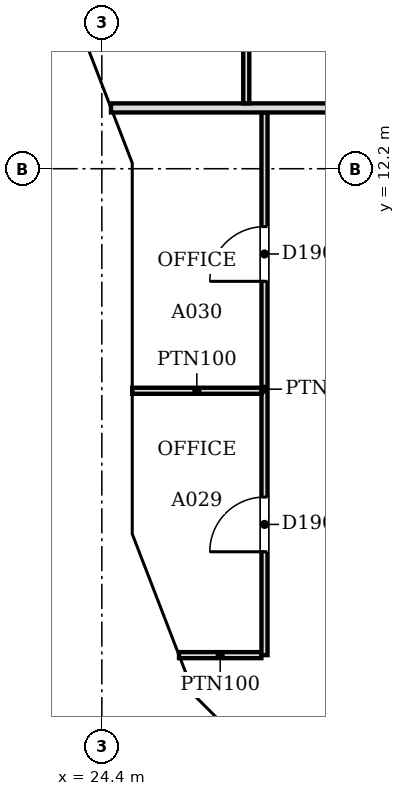
"""IFC4 building model, lengths in metres.
Left out: names, types, materials, properties, quantities, classifications, styles, units other than length and angle.
Written with IfcOpenShell. Run it as: python <this file> out.ifc"""

import sys

from ifc_helpers import new_model, si_unit, direction, frame, frame_2d, origin, place, context, subcontext, project, spatial, polyline, rectangle, outline, extrude, faceted_brep, source, transform, mapped, element, fill, save


model = new_model("IFC4")
c1 = context("Model", 3, precision=1e-05, world=origin(), true_north=direction((0.0, 1.0)))
c2 = subcontext(c1, "Body", "Model", "MODEL_VIEW")
j1 = project(units=[si_unit("LENGTHUNIT", "METRE"), si_unit("PLANEANGLEUNIT", "RADIAN")], contexts=[c1])
p1 = place(None, origin())
s1 = spatial("IfcSite", under=j1, at=p1, CompositionType="ELEMENT")
p2 = place(p1, origin())
s2 = spatial("IfcBuilding", under=s1, at=p2, CompositionType="ELEMENT")
p3 = place(p2, frame((0.0, 0.0, 16.8)))
s3 = spatial("IfcBuildingStorey", under=s2, at=p3, CompositionType="ELEMENT", Elevation=16.8)
m1 = source(origin(), c2, "Body", "Brep", [
    faceted_brep([(3.156, -0.25, 0.066), (0.106, -0.25, 4.424), (0.106, -0.25, 0.0), (3.156, -0.25, 0.0), (0.0, 0.25, 4.425), (0.053, 0.25, 4.5), (3.202, 0.25, 0.0), (0.0, 0.25, 0.0), (0.053, 0.0, 4.5), (3.202, -0.0, 0.0)], [[[0, 1, 2, 3]], [[4, 5, 6, 7]], [[6, 5, 8, 1, 0, 9]], [[5, 4, 8]], [[7, 6, 9, 3, 2]], [[7, 2, 1, 8, 4]], [[3, 9, 0]]]),
])
p4 = place(p3, frame((23.497, 15.234, 0.0), z_axis=(0.0, 0.0, 1.0), x_axis=(0.359913782069, -0.932985567668, 0.0)))
e1 = element("IfcWall", 1, at=p4, inside=s3, PredefinedType="SOLIDWALL", context=c2, shape_type="MappedRepresentation", body=[
    mapped(m1, transform((0.0, 0.0, 0.0), scale=1.0)),
])
m2 = source(origin(), c2, "Body", "SweptSolid", [
    extrude(outline(polyline([(2.722, 0.25), (0.253, 3.778), (0.253, 0.25), (2.722, 0.25)])), frame((0.0, 0.26, 0.0), z_axis=(0.0, -1.0, 0.0), x_axis=(1.0, 0.0, 0.0)), (0.0, 0.0, 1.0), 0.52),
])
p5 = place(p4, origin())
e2 = element("IfcOpeningElement", 2, at=p5, cuts=e1, PredefinedType="OPENING", context=c2, shape_type="MappedRepresentation", body=[
    mapped(m2, transform((0.0, 0.0, 0.0), scale=1.0)),
])
m3 = source(origin(), c2, "Body", "Brep", [
    faceted_brep([(6.1, -0.25, 0.0), (3.096, -0.25, 4.5), (0.047, -0.25, 0.068), (0.047, -0.25, 0.0), (0.0, 0.25, 0.0), (3.096, 0.25, 4.5), (6.053, 0.25, 0.07), (6.053, 0.25, 0.0), (6.1, -0.0, 0.0), (0.0, 0.0, 0.0)], [[[0, 1, 2, 3]], [[4, 5, 6, 7]], [[6, 5, 1, 0, 8]], [[5, 4, 9, 2, 1]], [[4, 7, 8, 0, 3, 9]], [[9, 3, 2]], [[8, 7, 6]]]),
])
p6 = place(p3, frame((24.65, 12.247, 0.0), z_axis=(0.0, 0.0, 1.0), x_axis=(0.0, -1.0, 0.0)))
e3 = element("IfcWall", 3, at=p6, inside=s3, PredefinedType="SOLIDWALL", context=c2, shape_type="MappedRepresentation", body=[
    mapped(m3, transform((0.0, 0.0, 0.0), scale=1.0)),
])
m4 = source(origin(), c2, "Body", "SweptSolid", [
    extrude(outline(polyline([(5.633, 0.25), (3.094, 4.054), (0.476, 0.25), (5.633, 0.25)])), frame((0.0, 0.26, 0.0), z_axis=(0.0, -1.0, 0.0), x_axis=(1.0, 0.0, 0.0)), (0.0, 0.0, 1.0), 0.52),
])
p7 = place(p6, origin())
e4 = element("IfcOpeningElement", 4, at=p7, cuts=e3, PredefinedType="OPENING", context=c2, shape_type="MappedRepresentation", body=[
    mapped(m4, transform((0.0, 0.0, 0.0), scale=1.0)),
])
m5 = source(origin(), c2, "Body", "Brep", [
    faceted_brep([(3.003, -0.25, 4.419), (2.95, -0.25, 4.5), (0.0, -0.25, 0.0), (3.003, -0.25, 0.0), (0.047, 0.25, 0.071), (2.898, 0.25, 4.419), (2.898, 0.25, 0.0), (0.047, 0.25, 0.0), (2.95, 0.0, 4.5), (0.0, 0.0, 0.0)], [[[0, 1, 2, 3]], [[4, 5, 6, 7]], [[8, 1, 0]], [[5, 4, 9, 2, 1, 8]], [[7, 6, 3, 2, 9]], [[7, 9, 4]], [[3, 6, 5, 8, 0]]]),
])
p8 = place(p3, frame((24.65, 6.146, 0.0), z_axis=(0.0, 0.0, 1.0), x_axis=(0.359953949349, -0.932970071518, 0.0)))
e5 = element("IfcWall", 5, at=p8, inside=s3, PredefinedType="SOLIDWALL", context=c2, shape_type="MappedRepresentation", body=[
    mapped(m5, transform((0.0, 0.0, 0.0), scale=1.0)),
])
m6 = source(origin(), c2, "Body", "SweptSolid", [
    extrude(outline(polyline([(2.75, 3.739), (0.463, 0.25), (2.75, 0.25), (2.75, 3.739)])), frame((0.0, 0.26, 0.0), z_axis=(0.0, -1.0, 0.0), x_axis=(1.0, 0.0, 0.0)), (0.0, 0.0, 1.0), 0.52),
])
p9 = place(p8, origin())
e6 = element("IfcOpeningElement", 6, at=p9, cuts=e5, PredefinedType="OPENING", context=c2, shape_type="MappedRepresentation", body=[
    mapped(m6, transform((0.0, 0.0, 0.0), scale=1.0)),
])
m7 = source(origin(), c2, "Body", "Brep", [
    faceted_brep([(2.997, -0.25, 0.0), (0.053, -0.25, 4.5), (0.0, -0.25, 4.419), (0.0, -0.25, 0.0), (0.106, 0.25, 4.419), (2.944, 0.25, 0.081), (2.944, 0.25, 0.0), (0.106, 0.25, 0.0), (0.053, 0.0, 4.5), (2.997, 0.0, 0.0)], [[[0, 1, 2, 3]], [[4, 5, 6, 7]], [[5, 4, 8, 1, 0, 9]], [[2, 1, 8]], [[7, 6, 9, 0, 3]], [[7, 3, 2, 8, 4]], [[9, 6, 5]]]),
])
p10 = place(p3, frame((25.675, 3.431, 0.0), z_axis=(0.0, 0.0, 1.0), x_axis=(0.707106781187, -0.707106781187, 0.0)))
e7 = element("IfcWall", 7, at=p10, inside=s3, PredefinedType="SOLIDWALL", context=c2, shape_type="MappedRepresentation", body=[
    mapped(m7, transform((0.0, 0.0, 0.0), scale=1.0)),
])
m8 = source(origin(), c2, "Body", "SweptSolid", [
    extrude(outline(polyline([(2.535, 0.25), (0.253, 3.738), (0.253, 0.25), (2.535, 0.25)])), frame((0.0, 0.26, 0.0), z_axis=(0.0, -1.0, 0.0), x_axis=(1.0, 0.0, 0.0)), (0.0, 0.0, 1.0), 0.52),
])
p11 = place(p10, origin())
e8 = element("IfcOpeningElement", 8, at=p11, cuts=e7, PredefinedType="OPENING", context=c2, shape_type="MappedRepresentation", body=[
    mapped(m8, transform((0.0, 0.0, 0.0), scale=1.0)),
])
p12 = place(p2, frame((0.0, 0.0, 21.3)))
s4 = spatial("IfcBuildingStorey", under=s2, at=p12, CompositionType="ELEMENT", Elevation=21.3)
m9 = source(origin(), c2, "Body", "Brep", [
    faceted_brep([(3.103, -0.25, 8.934), (0.053, -0.25, 4.576), (0.053, -0.25, 4.424), (3.103, -0.25, 0.066), (0.0, 0.25, 4.5), (3.149, 0.25, 9.0), (3.196, 0.25, 8.932), (3.196, 0.25, 0.068), (3.149, 0.25, 0.0), (3.149, -0.0, 0.0), (3.149, -0.0, 9.0), (0.0, 0.0, 4.5)], [[[0, 1, 2, 3]], [[4, 5, 6, 7, 8]], [[8, 7, 9]], [[6, 5, 10]], [[5, 4, 11, 1, 0, 10]], [[4, 8, 9, 3, 2, 11]], [[11, 2, 1]], [[3, 9, 7, 6, 10, 0]]]),
])
p13 = place(p12, frame((23.517, 15.185, -4.5), z_axis=(0.0, 0.0, 1.0), x_axis=(0.359864468756, -0.933004589553, 0.0)))
e9 = element("IfcWall", 9, at=p13, inside=s4, PredefinedType="SOLIDWALL", context=c2, shape_type="MappedRepresentation", body=[
    mapped(m9, transform((0.0, 0.0, 0.0), scale=1.0)),
])
m10 = source(origin(), c2, "Body", "SweptSolid", [
    extrude(outline(polyline([(2.949, 8.278), (0.305, 4.5), (2.949, 0.722), (2.949, 8.278)])), frame((0.0, 0.26, 0.0), z_axis=(0.0, -1.0, 0.0), x_axis=(1.0, 0.0, 0.0)), (0.0, 0.0, 1.0), 0.52),
])
p14 = place(p13, origin())
e10 = element("IfcOpeningElement", 10, at=p14, cuts=e9, PredefinedType="OPENING", context=c2, shape_type="MappedRepresentation", body=[
    mapped(m10, transform((0.0, 0.0, 0.0), scale=1.0)),
])
m11 = source(origin(), c2, "Body", "Brep", [
    faceted_brep([(0.093, -0.25, 0.068), (3.143, -0.25, 4.5), (0.093, -0.25, 8.932), (0.0, 0.25, 8.934), (0.047, 0.25, 9.0), (3.143, 0.25, 4.5), (0.047, 0.25, 0.0), (0.0, 0.25, 0.066), (0.047, 0.0, 0.0), (0.047, 0.0, 9.0)], [[[0, 1, 2]], [[3, 4, 5, 6, 7]], [[6, 5, 1, 0, 8]], [[5, 4, 9, 2, 1]], [[4, 3, 9]], [[7, 6, 8]], [[7, 8, 0, 2, 9, 3]]]),
])
p15 = place(p12, frame((24.65, 12.293, -4.5), z_axis=(0.0, 0.0, 1.0), x_axis=(0.0, -1.0, 0.0)))
e11 = element("IfcWall", 11, at=p15, inside=s4, PredefinedType="SOLIDWALL", context=c2, shape_type="MappedRepresentation", body=[
    mapped(m11, transform((0.0, 0.0, 0.0), scale=1.0)),
])
m12 = source(origin(), c2, "Body", "SweptSolid", [
    extrude(outline(polyline([(0.247, 0.732), (2.84, 4.5), (0.247, 8.268), (0.247, 0.732)])), frame((0.0, 0.26, 0.0), z_axis=(0.0, -1.0, 0.0), x_axis=(1.0, 0.0, 0.0)), (0.0, 0.0, 1.0), 0.52),
])
p16 = place(p15, origin())
e12 = element("IfcOpeningElement", 12, at=p16, cuts=e11, PredefinedType="OPENING", context=c2, shape_type="MappedRepresentation", body=[
    mapped(m12, transform((0.0, 0.0, 0.0), scale=1.0)),
])
m13 = source(origin(), c2, "Body", "Brep", [
    faceted_brep([(3.003, -0.25, 0.0), (3.05, -0.25, 0.071), (3.05, -0.25, 8.929), (3.003, -0.25, 9.0), (0.0, -0.25, 4.5), (0.0, 0.25, 4.5), (2.957, 0.25, 8.93), (2.957, 0.25, 0.07), (3.003, 0.0, 0.0), (3.003, 0.0, 9.0)], [[[0, 1, 2, 3, 4]], [[5, 6, 7]], [[1, 0, 8]], [[9, 3, 2]], [[6, 5, 4, 3, 9]], [[5, 7, 8, 0, 4]], [[1, 8, 7, 6, 9, 2]]]),
])
p17 = place(p12, frame((24.65, 9.15, -4.5), z_axis=(0.0, 0.0, 1.0), x_axis=(0.0, -1.0, 0.0)))
e13 = element("IfcWall", 13, at=p17, inside=s4, PredefinedType="SOLIDWALL", context=c2, shape_type="MappedRepresentation", body=[
    mapped(m13, transform((0.0, 0.0, 0.0), scale=1.0)),
])
m14 = source(origin(), c2, "Body", "SweptSolid", [
    extrude(outline(polyline([(2.803, 8.25), (0.301, 4.5), (2.803, 0.75), (2.803, 8.25)])), frame((0.0, 0.26, 0.0), z_axis=(0.0, -1.0, 0.0), x_axis=(1.0, 0.0, 0.0)), (0.0, 0.0, 1.0), 0.52),
])
p18 = place(p17, origin())
e14 = element("IfcOpeningElement", 14, at=p18, cuts=e13, PredefinedType="OPENING", context=c2, shape_type="MappedRepresentation", body=[
    mapped(m14, transform((0.0, 0.0, 0.0), scale=1.0)),
])
m15 = source(origin(), c2, "Body", "Brep", [
    faceted_brep([(0.047, -0.25, 0.0), (2.997, -0.25, 4.5), (0.047, -0.25, 9.0), (0.0, -0.25, 8.93), (0.0, -0.25, 0.07), (0.093, 0.25, 8.929), (2.944, 0.25, 4.581), (2.944, 0.25, 4.419), (0.093, 0.25, 0.071), (2.997, 0.0, 4.5), (0.047, 0.0, 0.0), (0.047, 0.0, 9.0)], [[[0, 1, 2, 3, 4]], [[5, 6, 7, 8]], [[8, 7, 9, 1, 0, 10]], [[6, 5, 11, 2, 1, 9]], [[3, 2, 11]], [[10, 0, 4]], [[8, 10, 4, 3, 11, 5]], [[9, 7, 6]]]),
])
p19 = place(p12, frame((24.633, 6.19, -4.5), z_axis=(0.0, 0.0, 1.0), x_axis=(0.359901446078, -0.932990326376, 0.0)))
e15 = element("IfcWall", 15, at=p19, inside=s4, PredefinedType="SOLIDWALL", context=c2, shape_type="MappedRepresentation", body=[
    mapped(m15, transform((0.0, 0.0, 0.0), scale=1.0)),
])
m16 = source(origin(), c2, "Body", "SweptSolid", [
    extrude(outline(polyline([(0.247, 0.761), (2.698, 4.5), (0.247, 8.239), (0.247, 0.761)])), frame((0.0, 0.26, 0.0), z_axis=(0.0, -1.0, 0.0), x_axis=(1.0, 0.0, 0.0)), (0.0, 0.0, 1.0), 0.52),
])
p20 = place(p19, origin())
e16 = element("IfcOpeningElement", 16, at=p20, cuts=e15, PredefinedType="OPENING", context=c2, shape_type="MappedRepresentation", body=[
    mapped(m16, transform((0.0, 0.0, 0.0), scale=1.0)),
])
m17 = source(origin(), c2, "Body", "Brep", [
    faceted_brep([(2.944, -0.25, 0.0), (2.997, -0.25, 0.081), (2.997, -0.25, 8.919), (2.944, -0.25, 9.0), (0.0, -0.25, 4.5), (0.053, 0.25, 4.581), (2.891, 0.25, 8.919), (2.891, 0.25, 0.081), (0.053, 0.25, 4.419), (2.944, 0.0, 0.0), (2.944, 0.0, 9.0), (0.0, 0.0, 4.5)], [[[0, 1, 2, 3, 4]], [[5, 6, 7, 8]], [[1, 0, 9]], [[10, 3, 2]], [[6, 5, 11, 4, 3, 10]], [[8, 7, 9, 0, 4, 11]], [[8, 11, 5]], [[1, 9, 7, 6, 10, 2]]]),
])
p21 = place(p12, frame((25.712, 3.394, -4.5), z_axis=(0.0, 0.0, 1.0), x_axis=(0.707066050402, -0.707147509625, 0.0)))
e17 = element("IfcWall", 17, at=p21, inside=s4, PredefinedType="SOLIDWALL", context=c2, shape_type="MappedRepresentation", body=[
    mapped(m17, transform((0.0, 0.0, 0.0), scale=1.0)),
])
m18 = source(origin(), c2, "Body", "SweptSolid", [
    extrude(outline(polyline([(2.744, 8.238), (0.299, 4.5), (2.744, 0.762), (2.744, 8.238)])), frame((0.0, 0.26, 0.0), z_axis=(0.0, -1.0, 0.0), x_axis=(1.0, 0.0, 0.0)), (0.0, 0.0, 1.0), 0.52),
])
p22 = place(p21, origin())
e18 = element("IfcOpeningElement", 18, at=p22, cuts=e17, PredefinedType="OPENING", context=c2, shape_type="MappedRepresentation", body=[
    mapped(m18, transform((0.0, 0.0, 0.0), scale=1.0)),
])
p23 = place(p3, frame((25.669, 4.2, 0.0), z_axis=(0.0, 0.0, 1.0), x_axis=(1.0, 0.0, 0.0)))
e19 = element("IfcWall", 19, at=p23, inside=s3, PredefinedType="PARTITIONING", context=c2, shape_type="SweptSolid", body=[
    extrude(rectangle(XDim=1.355, YDim=0.1, at=frame_2d((0.678, 0.0))), origin(), (0.0, 0.0, 1.0), 3.415),
])
p24 = place(p3, frame((27.075, 4.2, 0.0), z_axis=(0.0, 0.0, 1.0), x_axis=(0.0, 1.0, 0.0)))
e20 = element("IfcWall", 20, at=p24, inside=s3, PredefinedType="PARTITIONING", context=c2, shape_type="SweptSolid", body=[
    extrude(rectangle(XDim=8.924, YDim=0.1, at=frame_2d((4.462, 0.0))), origin(), (0.0, 0.0, 1.0), 3.415),
])
m19 = source(origin(), c2, "Body", "SweptSolid", [
    extrude(rectangle(XDim=0.9, YDim=2.1, at=frame_2d((0.45, 1.05))), frame((0.0, 0.06, 0.0), z_axis=(0.0, -1.0, 0.0), x_axis=(1.0, 0.0, 0.0)), (0.0, 0.0, 1.0), 0.12),
])
p25 = place(p24, frame((6.148, 0.0, 0.0)))
e21 = element("IfcOpeningElement", 21, at=p25, cuts=e20, PredefinedType="OPENING", context=c2, shape_type="MappedRepresentation", body=[
    mapped(m19, transform((0.0, 0.0, 0.0), scale=1.0)),
])
p26 = place(p24, frame((1.7, 0.0, 0.0)))
e22 = element("IfcOpeningElement", 22, at=p26, cuts=e20, PredefinedType="OPENING", context=c2, shape_type="MappedRepresentation", body=[
    mapped(m19, transform((0.0, 0.0, 0.0), scale=1.0)),
])
p27 = place(p3, frame((24.9, 8.548, 0.0), z_axis=(0.0, 0.0, 1.0), x_axis=(1.0, 0.0, 0.0)))
e23 = element("IfcWall", 23, at=p27, inside=s3, PredefinedType="PARTITIONING", context=c2, shape_type="SweptSolid", body=[
    extrude(rectangle(XDim=2.124, YDim=0.1, at=frame_2d((1.062, 0.0))), origin(), (0.0, 0.0, 1.0), 3.415),
])
p28 = place(p3, frame((24.55, 13.2, 0.0), z_axis=(0.0, 0.0, 1.0), x_axis=(1.0, 0.0, 0.0)))
e24 = element("IfcWall", 24, at=p28, inside=s3, PredefinedType="PARTITIONING", context=c2, shape_type="SweptSolid", body=[
    extrude(rectangle(XDim=19.374, YDim=0.15, at=frame_2d((9.687, 0.0))), origin(), (0.0, 0.0, 1.0), 3.415),
])
p29 = place(p3, frame((26.775, 13.276, 0.0), z_axis=(0.0, 0.0, 1.0), x_axis=(0.0, 1.0, 0.0)))
e25 = element("IfcWall", 25, at=p29, inside=s3, PredefinedType="PARTITIONING", context=c2, shape_type="SweptSolid", body=[
    extrude(rectangle(XDim=5.448, YDim=0.1, at=frame_2d((2.724, 0.0))), origin(), (0.0, 0.0, 1.0), 3.415),
])
p30 = place(p29, frame((2.3, 0.0, 0.0)))
e26 = element("IfcOpeningElement", 26, at=p30, cuts=e25, PredefinedType="OPENING", context=c2, shape_type="MappedRepresentation", body=[
    mapped(m19, transform((0.0, 0.0, 0.0), scale=1.0)),
])
m20 = source(origin(), c2, "Body", "SweptSolid", [
    extrude(rectangle(XDim=0.9, YDim=2.1, at=frame_2d((0.45, 1.05))), frame((0.0, 0.025, 0.0), z_axis=(0.0, -1.0, 0.0), x_axis=(1.0, 0.0, 0.0)), (0.0, 0.0, 1.0), 0.05),
])
p31 = place(p25, origin())
e27 = element("IfcDoor", 27, at=p31, inside=s3, OperationType="SINGLE_SWING_LEFT", PredefinedType="DOOR", context=c2, shape_type="MappedRepresentation", body=[
    mapped(m20, transform((0.0, 0.0, 0.0), scale=1.0)),
])
fill(e21, e27)
p32 = place(p26, origin())
e28 = element("IfcDoor", 28, at=p32, inside=s3, OperationType="SINGLE_SWING_LEFT", PredefinedType="DOOR", context=c2, shape_type="MappedRepresentation", body=[
    mapped(m20, transform((0.0, 0.0, 0.0), scale=1.0)),
])
fill(e22, e28)
save(model, sys.argv[1])
